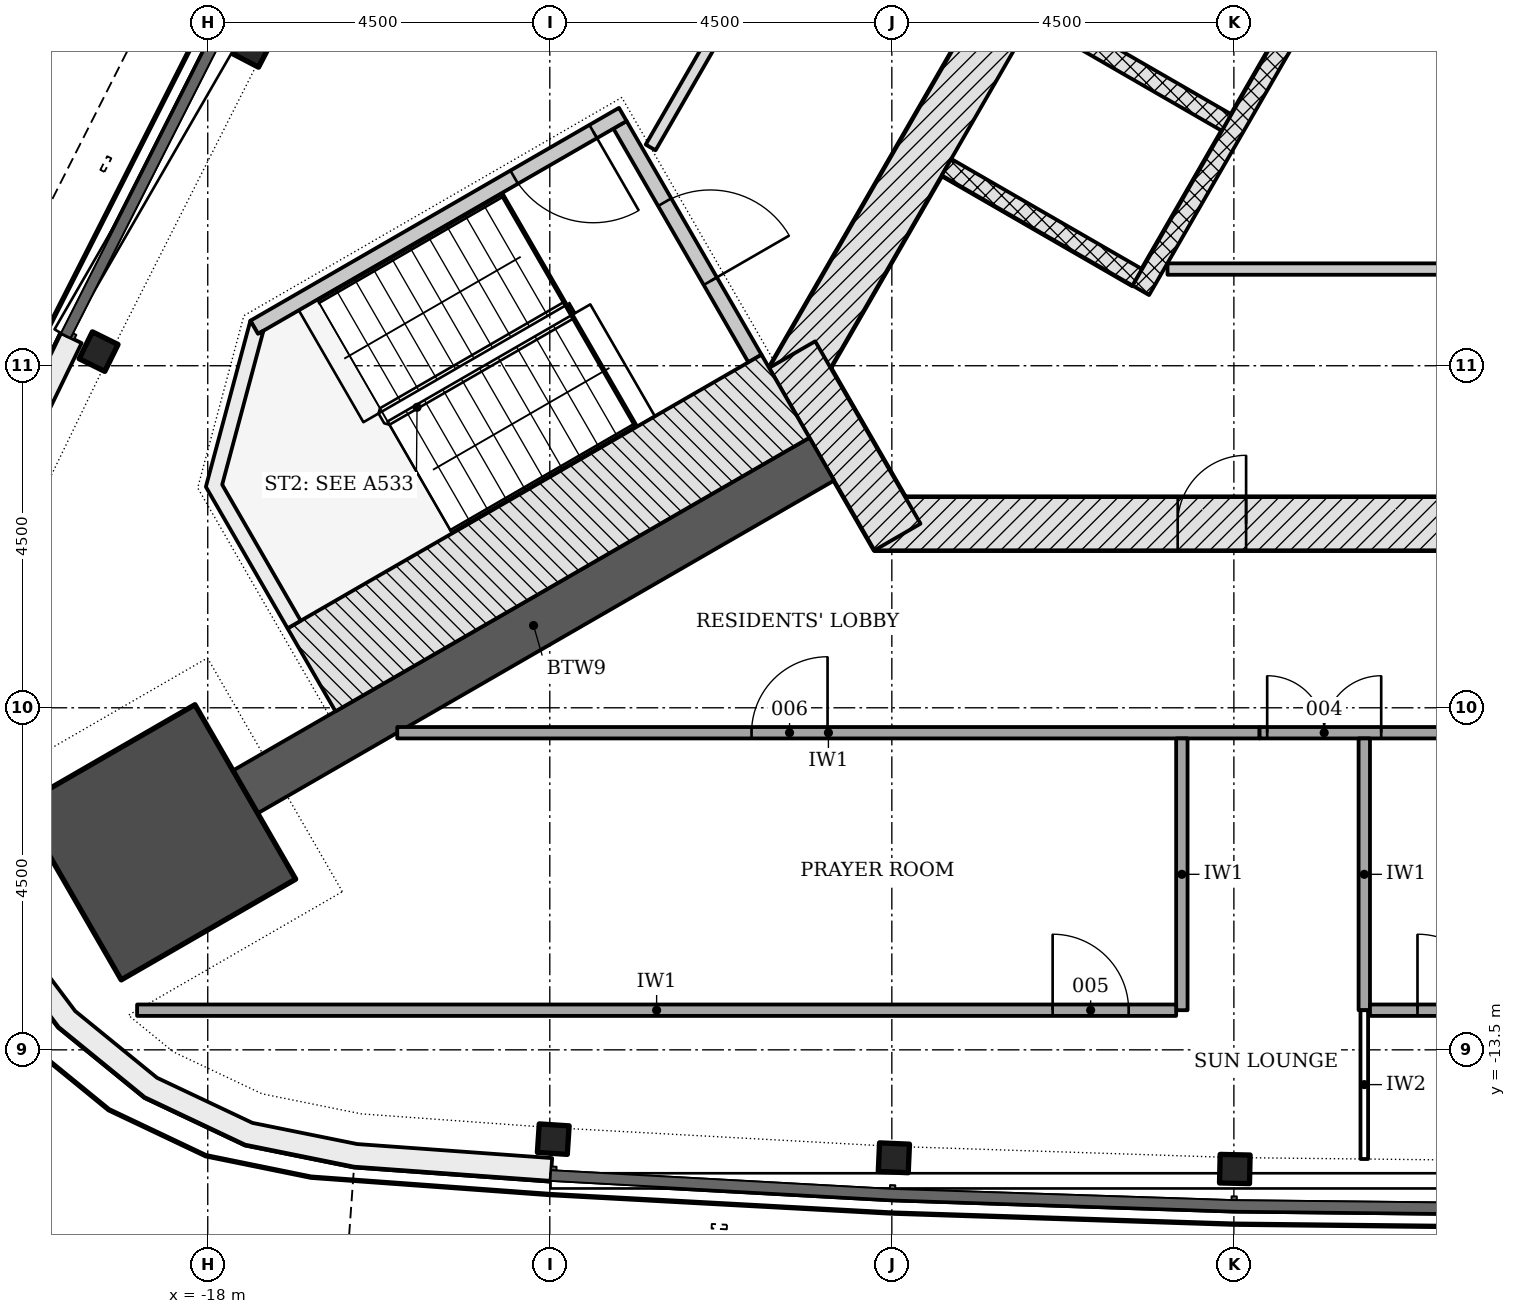
"""IFC4 building model, lengths in metres.
Left out: names, types, materials, properties, quantities, classifications, styles, units other than length and angle.
Written with IfcOpenShell. Run it as: python <this file> out.ifc"""

import sys

from ifc_helpers import new_model, si_unit, direction, frame, frame_2d, origin, origin_2d, place, context, subcontext, project, spatial, polyline, rectangle, i_section, outline, extrude, element, fill, save


model = new_model("IFC4")
c1 = context("Model", 3, precision=1e-05, world=origin(), true_north=direction((0.0, 1.0)))
c2 = subcontext(c1, "Body", "Model", "MODEL_VIEW")
j1 = project(units=[si_unit("LENGTHUNIT", "METRE"), si_unit("PLANEANGLEUNIT", "RADIAN")], contexts=[c1])
p1 = place(None, origin())
s1 = spatial("IfcSite", under=j1, at=p1, CompositionType="ELEMENT")
p2 = place(p1, origin())
s2 = spatial("IfcBuilding", under=s1, at=p2, CompositionType="ELEMENT")
p3 = place(p2, frame((0.0, 0.0, 203.1)))
s3 = spatial("IfcBuildingStorey", under=s2, at=p3, CompositionType="ELEMENT", Elevation=203.1)
p4 = place(p3, frame((-9.229, -6.578, -0.2), z_axis=(0.0, 0.0, 1.0), x_axis=(1.0, 0.0, 0.0)))
e1 = element("IfcWall", 1, at=p4, inside=s3, PredefinedType="SHEAR", context=c2, shape_type="SweptSolid", body=[
    extrude(rectangle(XDim=18.458, YDim=0.7, at=frame_2d((9.229, 0.0))), origin(), (0.0, 0.0, 1.0), 3.6),
])
p5 = place(p4, frame((8.7, 0.0, 0.2)))
e2 = element("IfcOpeningElement", 2, at=p5, cuts=e1, PredefinedType="OPENING", context=c2, shape_type="SweptSolid", body=[
    extrude(rectangle(XDim=1.0, YDim=2.1, at=frame_2d((0.5, 1.05))), frame((0.0, 0.36, 0.0), z_axis=(0.0, -1.0, 0.0), x_axis=(1.0, 0.0, 0.0)), (0.0, 0.0, 1.0), 0.72),
])
p6 = place(p4, frame((3.99, 0.0, 0.2)))
e3 = element("IfcOpeningElement", 3, at=p6, cuts=e1, PredefinedType="OPENING", context=c2, shape_type="SweptSolid", body=[
    extrude(rectangle(XDim=0.9, YDim=2.1, at=frame_2d((0.45, 1.05))), frame((0.0, 0.36, 0.0), z_axis=(0.0, -1.0, 0.0), x_axis=(1.0, 0.0, 0.0)), (0.0, 0.0, 1.0), 0.72),
])
p7 = place(p4, frame((13.489, 0.0, 0.2)))
e4 = element("IfcOpeningElement", 4, at=p7, cuts=e1, PredefinedType="OPENING", context=c2, shape_type="SweptSolid", body=[
    extrude(rectangle(XDim=1.0, YDim=2.1, at=frame_2d((0.5, 1.05))), frame((0.0, 0.36, 0.0), z_axis=(0.0, -1.0, 0.0), x_axis=(1.0, 0.0, 0.0)), (0.0, 0.0, 1.0), 0.72),
])
p8 = place(p3, frame((-1.083, 11.281, -0.2), z_axis=(0.0, 0.0, 1.0), x_axis=(-0.500001446645, -0.866024568562, 0.0)))
e5 = element("IfcWall", 5, at=p8, inside=s3, PredefinedType="SHEAR", context=c2, shape_type="SweptSolid", body=[
    extrude(rectangle(XDim=18.458, YDim=0.7, at=frame_2d((9.229, 0.0))), origin(), (0.0, 0.0, 1.0), 3.6),
])
p9 = place(p8, frame((8.979, 0.0, 0.2)))
e6 = element("IfcOpeningElement", 6, at=p9, cuts=e5, PredefinedType="OPENING", context=c2, shape_type="SweptSolid", body=[
    extrude(rectangle(XDim=1.2, YDim=2.1, at=frame_2d((0.6, 1.05))), frame((0.0, 0.36, 0.0), z_axis=(0.0, -1.0, 0.0), x_axis=(1.0, 0.0, 0.0)), (0.0, 0.0, 1.0), 0.72),
])
p10 = place(p8, frame((11.029, 0.0, 0.2)))
e7 = element("IfcOpeningElement", 7, at=p10, cuts=e5, PredefinedType="OPENING", context=c2, shape_type="SweptSolid", body=[
    extrude(rectangle(XDim=1.2, YDim=2.1, at=frame_2d((0.6, 1.05))), frame((0.0, 0.36, 0.0), z_axis=(0.0, -1.0, 0.0), x_axis=(1.0, 0.0, 0.0)), (0.0, 0.0, 1.0), 0.72),
])
p11 = place(p3, frame((-10.311, -4.353, -0.2), z_axis=(0.0, 0.0, 1.0), x_axis=(0.500042739161, -0.866000726912, 0.0)))
e8 = element("IfcWall", 8, at=p11, inside=s3, PredefinedType="SHEAR", context=c2, shape_type="SweptSolid", body=[
    extrude(rectangle(XDim=2.771, YDim=0.7, at=frame_2d((1.386, 0.0))), origin(), (0.0, 0.0, 1.0), 3.6),
])
p12 = place(p3, frame((-9.922, -5.728, -0.2), z_axis=(0.0, 0.0, 1.0), x_axis=(-0.866030064713, -0.499991926948, 0.0)))
e9 = element("IfcWall", 9, at=p12, inside=s3, PredefinedType="SHEAR", context=c2, shape_type="SweptSolid", body=[
    extrude(rectangle(XDim=8.758, YDim=0.65, at=frame_2d((4.379, 0.0))), origin(), (0.0, 0.0, 1.0), 3.6),
])
p13 = place(p3, frame((-18.653, -10.77, -0.2), z_axis=(0.0, 0.0, 1.0), x_axis=(-0.866025403784, -0.5, 0.0)))
e10 = element("IfcColumn", 10, at=p13, inside=s3, PredefinedType="COLUMN", context=c2, shape_type="SweptSolid", body=[
    extrude(rectangle(XDim=2.65, YDim=2.65, at=origin_2d()), origin(), (0.0, 0.0, 1.0), 3.6),
])
for number, where, z_axis, x_axis in (
    (11, (-17.408, -0.311, -0.2), (0.0, 0.0, 1.0), (-0.462, -0.887, 0.0)),
    (12, (-19.436, -4.314, -0.2), (0.0, 0.0, 1.0), (-0.442, -0.897, 0.0)),
    (13, (-13.454, -14.675, -0.2), (0.0, 0.0, 1.0), (0.998, -0.066, 0.0)),
    (14, (-8.973, -14.92, -0.2), (0.0, 0.0, 1.0), (0.999, -0.044, 0.0)),
    (15, (-4.488, -15.068, -0.2), (0.0, 0.0, 1.0), (1.0, -0.022, 0.0)),
):
    element("IfcColumn", number, at=place(p3, frame(where, z_axis=z_axis, x_axis=x_axis)), inside=s3, PredefinedType="COLUMN", context=c2, shape_type="SweptSolid", body=[
        extrude(i_section(OverallWidth=0.394, OverallDepth=0.376, WebThickness=0.017, FlangeThickness=0.028, FilletRadius=0.015, at=origin_2d()), origin(), (0.0, 0.0, 1.0), 3.6),
    ])
p14 = place(p3, origin())
e16 = element("IfcWall", 16, at=p14, inside=s3, PredefinedType="NOTDEFINED", context=c2, shape_type="SweptSolid", body=[
    extrude(outline(polyline([(-19.929, -4.071), (-21.06, -6.403), (-21.526, -7.788), (-21.646, -9.245), (-21.412, -10.687), (-20.84, -12.032), (-19.961, -13.2), (-18.829, -14.123), (-17.508, -14.748), (-16.075, -15.037), (-13.49, -15.224), (-13.469, -14.925), (-16.034, -14.74), (-17.412, -14.461), (-18.667, -13.868), (-19.744, -12.99), (-20.578, -11.881), (-21.122, -10.603), (-21.344, -9.233), (-21.23, -7.849), (-20.782, -6.516), (-19.659, -4.202), (-19.929, -4.071)])), origin(), (0.0, 0.0, 1.0), 3.3),
])
for number, where, z_axis, x_axis in (
    (17, (-7.106, 0.148, -0.2), (0.0, 0.0, 1.0), (0.866, -0.5, 0.0)),
    (18, (-8.281, -1.887, -0.2), (0.0, 0.0, 1.0), (0.866, -0.5, 0.0)),
):
    element("IfcWall", number, at=place(p3, frame(where, z_axis=z_axis, x_axis=x_axis)), inside=s3, PredefinedType="PARTITIONING", context=c2, shape_type="SweptSolid", body=[
        extrude(rectangle(XDim=2.9, YDim=0.25, at=frame_2d((1.45, 0.0))), origin(), (0.0, 0.0, 1.0), 3.6),
    ])
p15 = place(p3, frame((-2.374, 2.294, 0.0), z_axis=(0.0, 0.0, 1.0), x_axis=(-0.500003174267, -0.866023571113, 0.0)))
e19 = element("IfcWall", 19, at=p15, inside=s3, PredefinedType="PARTITIONING", context=c2, shape_type="SweptSolid", body=[
    extrude(rectangle(XDim=6.7, YDim=0.25, at=frame_2d((3.35, 0.0))), origin(), (0.0, 0.0, 1.0), 3.4),
])
p16 = place(p3, frame((-5.373, -3.228, 0.0), z_axis=(0.0, 0.0, 1.0), x_axis=(1.0, 0.0, 0.0)))
e20 = element("IfcWall", 20, at=p16, inside=s3, PredefinedType="PARTITIONING", context=c2, shape_type="SweptSolid", body=[
    extrude(rectangle(XDim=4.545, YDim=0.15, at=frame_2d((2.272, 0.0))), origin(), (0.0, 0.0, 1.0), 3.4),
])
p17 = place(p3, frame((-12.576, -1.331, -0.2), z_axis=(0.0, 0.0, 1.0), x_axis=(0.499970499736, -0.8660424351, 0.0)))
e21 = element("IfcWall", 21, at=p17, inside=s3, PredefinedType="SHEAR", context=c2, shape_type="SweptSolid", body=[
    extrude(rectangle(XDim=3.55, YDim=0.2, at=frame_2d((1.775, 0.0))), origin(), (0.0, 0.0, 1.0), 3.6),
])
p18 = place(p17, frame((1.175, 0.0, 0.2)))
e22 = element("IfcOpeningElement", 22, at=p18, cuts=e21, PredefinedType="OPENING", context=c2, shape_type="SweptSolid", body=[
    extrude(rectangle(XDim=1.2, YDim=2.1, at=frame_2d((0.6, 1.05))), frame((0.0, 0.11, 0.0), z_axis=(0.0, -1.0, 0.0), x_axis=(1.0, 0.0, 0.0)), (0.0, 0.0, 1.0), 0.22),
])
p19 = place(p3, frame((-12.539, -1.194, -0.2), z_axis=(0.0, 0.0, 1.0), x_axis=(-0.866045472092, -0.499965239061, 0.0)))
e23 = element("IfcWall", 23, at=p19, inside=s3, PredefinedType="SHEAR", context=c2, shape_type="SweptSolid", body=[
    extrude(rectangle(XDim=5.6, YDim=0.2, at=frame_2d((2.8, 0.0))), origin(), (0.0, 0.0, 1.0), 3.6),
])
p20 = place(p19, frame((0.45, 0.0, 0.2)))
e24 = element("IfcOpeningElement", 24, at=p20, cuts=e23, PredefinedType="OPENING", context=c2, shape_type="SweptSolid", body=[
    extrude(rectangle(XDim=1.2, YDim=2.1, at=frame_2d((0.6, 1.05))), frame((0.0, 0.11, 0.0), z_axis=(0.0, -1.0, 0.0), x_axis=(1.0, 0.0, 0.0)), (0.0, 0.0, 1.0), 0.22),
])
p21 = place(p3, frame((-10.399, -4.901, -0.2), z_axis=(0.0, 0.0, 1.0), x_axis=(-0.866018442252, -0.500012057535, 0.0)))
e25 = element("IfcWall", 25, at=p21, inside=s3, PredefinedType="SHEAR", context=c2, shape_type="SweptSolid", body=[
    extrude(rectangle(XDim=7.2, YDim=1.261, at=frame_2d((3.6, 0.0))), origin(), (0.0, 0.0, 1.0), 3.6),
])
p22 = place(p3, frame((0.0, 0.0, -0.2)))
e26 = element("IfcWall", 26, at=p22, inside=s3, PredefinedType="SHEAR", context=c2, shape_type="SweptSolid", body=[
    extrude(outline(polyline([(-17.439, -3.907), (-18.025, -6.093), (-16.95, -7.955), (-16.777, -7.855), (-17.81, -6.065), (-17.267, -4.039), (-17.339, -4.081), (-17.339, -4.081), (-17.339, -4.081), (-17.339, -4.081), (-17.339, -4.081), (-17.339, -4.081), (-17.339, -4.081), (-17.339, -4.081), (-17.339, -4.081), (-17.339, -4.081), (-17.339, -4.081), (-17.339, -4.081), (-17.339, -4.081), (-17.339, -4.081), (-17.339, -4.081), (-17.339, -4.081), (-17.339, -4.081), (-17.439, -3.907)])), origin(), (0.0, 0.0, 1.0), 3.6),
])
p23 = place(p3, frame((-15.507, -9.328, 0.0), z_axis=(0.0, 0.0, 1.0), x_axis=(1.0, 0.0, 0.0)))
e27 = element("IfcWall", 27, at=p23, inside=s3, PredefinedType="PARTITIONING", context=c2, shape_type="SweptSolid", body=[
    extrude(rectangle(XDim=11.345, YDim=0.15, at=frame_2d((5.672, 0.0))), origin(), (0.0, 0.0, 1.0), 2.852),
])
p24 = place(p23, frame((4.661, 0.0, 0.0)))
e28 = element("IfcOpeningElement", 28, at=p24, cuts=e27, PredefinedType="OPENING", context=c2, shape_type="SweptSolid", body=[
    extrude(rectangle(XDim=1.0, YDim=2.1, at=frame_2d((0.5, 1.05))), frame((0.0, 0.085, 0.0), z_axis=(0.0, -1.0, 0.0), x_axis=(1.0, 0.0, 0.0)), (0.0, 0.0, 1.0), 0.17),
])
p25 = place(p3, frame((-4.162, -9.328, 0.0), z_axis=(0.0, 0.0, 1.0), x_axis=(1.0, 0.0, 0.0)))
e29 = element("IfcWall", 29, at=p25, inside=s3, PredefinedType="PARTITIONING", context=c2, shape_type="SweptSolid", body=[
    extrude(rectangle(XDim=4.362, YDim=0.15, at=frame_2d((2.181, 0.0))), origin(), (0.0, 0.0, 1.0), 2.852),
])
p26 = place(p25, frame((0.1, 0.0, 0.0)))
e30 = element("IfcOpeningElement", 30, at=p26, cuts=e29, PredefinedType="OPENING", context=c2, shape_type="SweptSolid", body=[
    extrude(rectangle(XDim=1.5, YDim=2.1, at=frame_2d((0.75, 1.05))), frame((0.0, 0.085, 0.0), z_axis=(0.0, -1.0, 0.0), x_axis=(1.0, 0.0, 0.0)), (0.0, 0.0, 1.0), 0.17),
])
for number, where, z_axis, x_axis in (
    (31, (-5.184, -9.403, 0.0), (0.0, 0.0, 1.0), (0.0, -1.0, 0.0)),
    (32, (-2.784, -9.403, 0.0), (0.0, 0.0, 1.0), (0.0, -1.0, 0.0)),
):
    element("IfcWall", number, at=place(p3, frame(where, z_axis=z_axis, x_axis=x_axis)), inside=s3, PredefinedType="PARTITIONING", context=c2, shape_type="SweptSolid", body=[
        extrude(rectangle(XDim=3.575, YDim=0.15, at=frame_2d((1.788, 0.0))), origin(), (0.0, 0.0, 1.0), 3.4),
    ])
p27 = place(p3, frame((-2.784, -12.979, 0.0), z_axis=(0.0, 0.0, 1.0), x_axis=(0.0, -1.0, 0.0)))
e33 = element("IfcWall", 33, at=p27, inside=s3, PredefinedType="PARTITIONING", context=c2, shape_type="SweptSolid", body=[
    extrude(rectangle(XDim=1.958, YDim=0.1, at=frame_2d((0.979, 0.0))), origin(), (0.0, 0.0, 1.0), 3.4),
])
p28 = place(p3, frame((-18.93, -12.979, 0.0), z_axis=(0.0, 0.0, 1.0), x_axis=(1.0, 0.0, 0.0)))
e34 = element("IfcWall", 34, at=p28, inside=s3, PredefinedType="PARTITIONING", context=c2, shape_type="SweptSolid", body=[
    extrude(rectangle(XDim=13.67, YDim=0.15, at=frame_2d((6.835, 0.0))), origin(), (0.0, 0.0, 1.0), 2.852),
])
p29 = place(p28, frame((12.045, 0.0, 0.0)))
e35 = element("IfcOpeningElement", 35, at=p29, cuts=e34, PredefinedType="OPENING", context=c2, shape_type="SweptSolid", body=[
    extrude(rectangle(XDim=1.0, YDim=2.1, at=frame_2d((0.5, 1.05))), frame((0.0, 0.085, 0.0), z_axis=(0.0, -1.0, 0.0), x_axis=(1.0, 0.0, 0.0)), (0.0, 0.0, 1.0), 0.17),
])
p30 = place(p3, frame((-2.709, -12.979, 0.0), z_axis=(0.0, 0.0, 1.0), x_axis=(1.0, 0.0, 0.0)))
e36 = element("IfcWall", 36, at=p30, inside=s3, PredefinedType="PARTITIONING", context=c2, shape_type="SweptSolid", body=[
    extrude(rectangle(XDim=14.318, YDim=0.15, at=frame_2d((7.159, 0.0))), origin(), (0.0, 0.0, 1.0), 2.852),
])
p31 = place(p30, frame((0.625, 0.0, 0.0)))
e37 = element("IfcOpeningElement", 37, at=p31, cuts=e36, PredefinedType="OPENING", context=c2, shape_type="SweptSolid", body=[
    extrude(rectangle(XDim=1.0, YDim=2.1, at=frame_2d((0.5, 1.05))), frame((0.0, 0.085, 0.0), z_axis=(0.0, -1.0, 0.0), x_axis=(1.0, 0.0, 0.0)), (0.0, 0.0, 1.0), 0.17),
])
p32 = place(p3, frame((-6.34, 8.476, 0.0), z_axis=(0.0, 0.0, 1.0), x_axis=(-0.499987514004, -0.866032612458, 0.0)))
e38 = element("IfcWall", 38, at=p32, inside=s3, PredefinedType="PARTITIONING", context=c2, shape_type="SweptSolid", body=[
    extrude(rectangle(XDim=11.667, YDim=0.15, at=frame_2d((5.833, 0.0))), origin(), (0.0, 0.0, 1.0), 2.852),
])
p33 = place(p6, origin())
e39 = element("IfcDoor", 39, at=p33, inside=s3, OperationType="SINGLE_SWING_RIGHT", PredefinedType="DOOR", context=c2, shape_type="SweptSolid", body=[
    extrude(rectangle(XDim=0.9, YDim=2.1, at=frame_2d((0.45, 1.05))), frame((0.0, 0.075, 0.0), z_axis=(0.0, -1.0, 0.0), x_axis=(1.0, 0.0, 0.0)), (0.0, 0.0, 1.0), 0.15),
])
fill(e3, e39)
p34 = place(p18, origin())
e40 = element("IfcDoor", 40, at=p34, inside=s3, OperationType="SINGLE_SWING_RIGHT", PredefinedType="DOOR", context=c2, shape_type="SweptSolid", body=[
    extrude(rectangle(XDim=1.2, YDim=2.1, at=frame_2d((0.6, 1.05))), frame((0.0, 0.025, 0.0), z_axis=(0.0, -1.0, 0.0), x_axis=(1.0, 0.0, 0.0)), (0.0, 0.0, 1.0), 0.05),
])
fill(e22, e40)
p35 = place(p20, origin())
e41 = element("IfcDoor", 41, at=p35, inside=s3, OperationType="SINGLE_SWING_LEFT", PredefinedType="DOOR", context=c2, shape_type="SweptSolid", body=[
    extrude(rectangle(XDim=1.2, YDim=2.1, at=frame_2d((0.6, 1.05))), frame((0.0, 0.025, 0.0), z_axis=(0.0, -1.0, 0.0), x_axis=(1.0, 0.0, 0.0)), (0.0, 0.0, 1.0), 0.05),
])
fill(e24, e41)
p36 = place(p26, origin())
e42 = element("IfcDoor", 42, at=p36, inside=s3, OperationType="DOUBLE_DOOR_SINGLE_SWING", PredefinedType="DOOR", context=c2, shape_type="SweptSolid", body=[
    extrude(rectangle(XDim=1.5, YDim=2.1, at=frame_2d((0.75, 1.05))), frame((0.0, 0.025, 0.0), z_axis=(0.0, -1.0, 0.0), x_axis=(1.0, 0.0, 0.0)), (0.0, 0.0, 1.0), 0.05),
])
fill(e30, e42)
p37 = place(p29, origin())
e43 = element("IfcDoor", 43, at=p37, inside=s3, OperationType="SINGLE_SWING_LEFT", PredefinedType="DOOR", context=c2, shape_type="SweptSolid", body=[
    extrude(rectangle(XDim=1.0, YDim=2.1, at=frame_2d((0.5, 1.05))), frame((0.0, 0.025, 0.0), z_axis=(0.0, -1.0, 0.0), x_axis=(1.0, 0.0, 0.0)), (0.0, 0.0, 1.0), 0.05),
])
fill(e35, e43)
p38 = place(p24, origin())
e44 = element("IfcDoor", 44, at=p38, inside=s3, OperationType="SINGLE_SWING_RIGHT", PredefinedType="DOOR", context=c2, shape_type="SweptSolid", body=[
    extrude(rectangle(XDim=1.0, YDim=2.1, at=frame_2d((0.5, 1.05))), frame((0.0, 0.025, 0.0), z_axis=(0.0, -1.0, 0.0), x_axis=(1.0, 0.0, 0.0)), (0.0, 0.0, 1.0), 0.05),
])
fill(e28, e44)
p39 = place(p31, origin())
e45 = element("IfcDoor", 45, at=p39, inside=s3, OperationType="SINGLE_SWING_LEFT", PredefinedType="DOOR", context=c2, shape_type="SweptSolid", body=[
    extrude(rectangle(XDim=1.0, YDim=2.1, at=frame_2d((0.5, 1.05))), frame((0.0, 0.025, 0.0), z_axis=(0.0, -1.0, 0.0), x_axis=(1.0, 0.0, 0.0)), (0.0, 0.0, 1.0), 0.05),
])
fill(e37, e45)
save(model, sys.argv[1])
